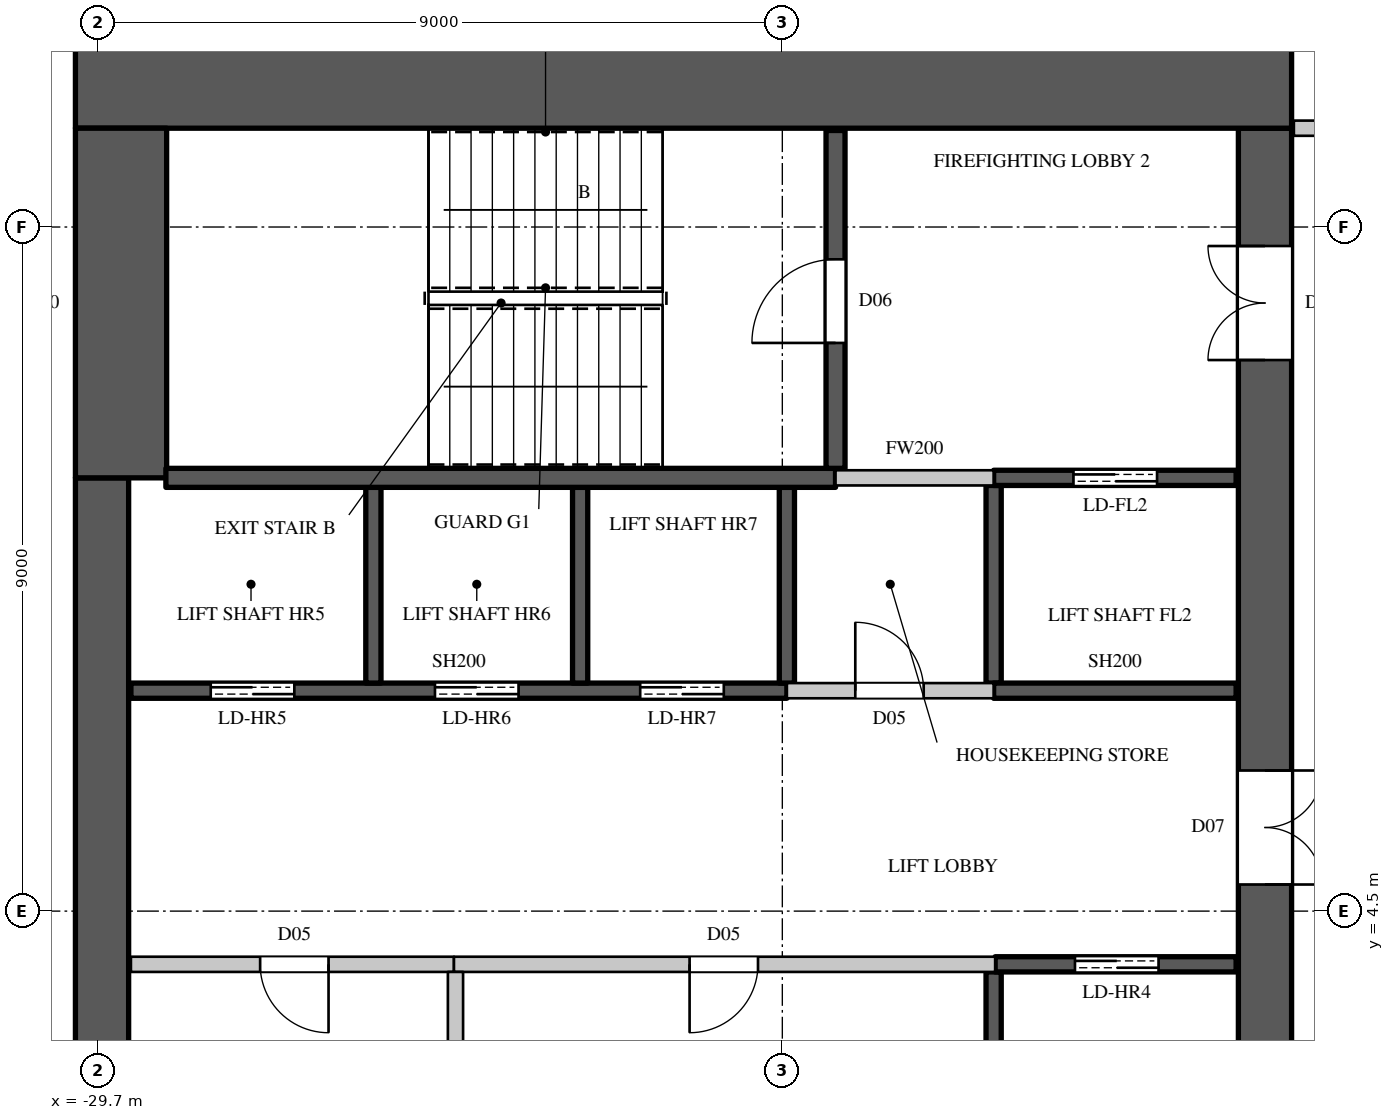
"""IFC4 building model, lengths in metres.
Left out: names, types, materials, properties, quantities, classifications, styles, units other than length and angle.
Written with IfcOpenShell. Run it as: python <this file> out.ifc"""

import sys

from ifc_helpers import new_model, si_unit, direction, frame, frame_2d, origin, place, context, subcontext, project, spatial, rectangle, extrude, element, fill, save


model = new_model("IFC4")
c1 = context("Model", 3, precision=1e-05, world=origin(), true_north=direction((0.0, 1.0)))
c2 = subcontext(c1, "Body", "Model", "MODEL_VIEW")
j1 = project(units=[si_unit("LENGTHUNIT", "METRE"), si_unit("PLANEANGLEUNIT", "RADIAN")], contexts=[c1])
p1 = place(None, origin())
s1 = spatial("IfcSite", under=j1, at=p1, CompositionType="ELEMENT")
p2 = place(p1, origin())
s2 = spatial("IfcBuilding", under=s1, at=p2, CompositionType="ELEMENT")
p3 = place(p2, frame((0.0, 0.0, 268.0)))
s3 = spatial("IfcBuildingStorey", under=s2, at=p3, CompositionType="ELEMENT", Elevation=268.0)
p4 = place(p3, frame((-30.0, 15.4, 0.0), z_axis=(0.0, 0.0, 1.0), x_axis=(1.0, 0.0, 0.0)))
e1 = element("IfcWall", 1, at=p4, inside=s3, PredefinedType="SHEAR", context=c2, shape_type="SweptSolid", body=[
    extrude(rectangle(XDim=16.0, YDim=1.2, at=frame_2d((8.0, 0.0))), origin(), (0.0, 0.0, 1.0), 4.1),
])
p5 = place(p3, frame((-14.35, -14.8, 0.0), z_axis=(0.0, 0.0, 1.0), x_axis=(0.0, 1.0, 0.0)))
e2 = element("IfcWall", 2, at=p5, inside=s3, PredefinedType="SHEAR", context=c2, shape_type="SweptSolid", body=[
    extrude(rectangle(XDim=29.6, YDim=0.7, at=frame_2d((14.8, 0.0))), origin(), (0.0, 0.0, 1.0), 4.1),
])
p6 = place(p5, frame((1.55, 0.0, 0.0)))
e3 = element("IfcOpeningElement", 3, at=p6, cuts=e2, PredefinedType="OPENING", context=c2, shape_type="SweptSolid", body=[
    extrude(rectangle(XDim=1.5, YDim=2.4, at=frame_2d((0.75, 1.2))), frame((0.0, 0.36, 0.0), z_axis=(0.0, -1.0, 0.0), x_axis=(1.0, 0.0, 0.0)), (0.0, 0.0, 1.0), 0.72),
])
p7 = place(p5, frame((26.55, 0.0, 0.0)))
e4 = element("IfcOpeningElement", 4, at=p7, cuts=e2, PredefinedType="OPENING", context=c2, shape_type="SweptSolid", body=[
    extrude(rectangle(XDim=1.5, YDim=2.4, at=frame_2d((0.75, 1.2))), frame((0.0, 0.36, 0.0), z_axis=(0.0, -1.0, 0.0), x_axis=(1.0, 0.0, 0.0)), (0.0, 0.0, 1.0), 0.72),
])
p8 = place(p5, frame((8.45, 0.0, 0.0)))
e5 = element("IfcOpeningElement", 5, at=p8, cuts=e2, PredefinedType="OPENING", context=c2, shape_type="SweptSolid", body=[
    extrude(rectangle(XDim=1.5, YDim=2.4, at=frame_2d((0.75, 1.2))), frame((0.0, 0.36, 0.0), z_axis=(0.0, -1.0, 0.0), x_axis=(1.0, 0.0, 0.0)), (0.0, 0.0, 1.0), 0.72),
])
p9 = place(p5, frame((19.65, 0.0, 0.0)))
e6 = element("IfcOpeningElement", 6, at=p9, cuts=e2, PredefinedType="OPENING", context=c2, shape_type="SweptSolid", body=[
    extrude(rectangle(XDim=1.5, YDim=2.4, at=frame_2d((0.75, 1.2))), frame((0.0, 0.36, 0.0), z_axis=(0.0, -1.0, 0.0), x_axis=(1.0, 0.0, 0.0)), (0.0, 0.0, 1.0), 0.72),
])
p10 = place(p5, frame((14.5, 0.0, 0.0)))
e7 = element("IfcOpeningElement", 7, at=p10, cuts=e2, PredefinedType="OPENING", context=c2, shape_type="SweptSolid", body=[
    extrude(rectangle(XDim=0.6, YDim=2.0, at=frame_2d((0.3, 1.0))), frame((0.0, 0.36, 0.0), z_axis=(0.0, -1.0, 0.0), x_axis=(1.0, 0.0, 0.0)), (0.0, 0.0, 1.0), 0.72),
])
p11 = place(p3, frame((-29.65, -10.2, 0.0), z_axis=(0.0, 0.0, 1.0), x_axis=(0.0, 1.0, 0.0)))
e8 = element("IfcWall", 8, at=p11, inside=s3, PredefinedType="SHEAR", context=c2, shape_type="SweptSolid", body=[
    extrude(rectangle(XDim=20.4, YDim=0.7, at=frame_2d((10.2, 0.0))), origin(), (0.0, 0.0, 1.0), 4.1),
])
p12 = place(p3, frame((-29.4, 10.2, 0.0), z_axis=(0.0, 0.0, 1.0), x_axis=(0.0, 1.0, 0.0)))
e9 = element("IfcWall", 9, at=p12, inside=s3, PredefinedType="SHEAR", context=c2, shape_type="SweptSolid", body=[
    extrude(rectangle(XDim=4.6, YDim=1.2, at=frame_2d((2.3, 0.0))), origin(), (0.0, 0.0, 1.0), 4.1),
])
p13 = place(p3, frame((-29.27, 3.8, 0.0), z_axis=(0.0, 0.0, 1.0), x_axis=(1.0, 0.0, 0.0)))
e10 = element("IfcWall", 10, at=p13, inside=s3, PredefinedType="PARTITIONING", context=c2, shape_type="SweptSolid", body=[
    extrude(rectangle(XDim=4.25, YDim=0.2, at=frame_2d((2.125, 0.0))), origin(), (0.0, 0.0, 1.0), 3.8),
])
p14 = place(p13, frame((1.7, 0.0, 0.0)))
e11 = element("IfcOpeningElement", 11, at=p14, cuts=e10, PredefinedType="OPENING", context=c2, shape_type="SweptSolid", body=[
    extrude(rectangle(XDim=0.9, YDim=2.2, at=frame_2d((0.45, 1.1))), frame((0.0, 0.11, 0.0), z_axis=(0.0, -1.0, 0.0), x_axis=(1.0, 0.0, 0.0)), (0.0, 0.0, 1.0), 0.22),
])
p15 = place(p3, frame((-20.64, 7.4, 0.0), z_axis=(0.0, 0.0, 1.0), x_axis=(1.0, 0.0, 0.0)))
e12 = element("IfcWall", 12, at=p15, inside=s3, PredefinedType="PARTITIONING", context=c2, shape_type="SweptSolid", body=[
    extrude(rectangle(XDim=2.72, YDim=0.2, at=frame_2d((1.36, 0.0))), origin(), (0.0, 0.0, 1.0), 3.8),
])
p16 = place(p15, frame((0.9, 0.0, 0.0)))
e13 = element("IfcOpeningElement", 13, at=p16, cuts=e12, PredefinedType="OPENING", context=c2, shape_type="SweptSolid", body=[
    extrude(rectangle(XDim=0.9, YDim=2.2, at=frame_2d((0.45, 1.1))), frame((0.0, 0.11, 0.0), z_axis=(0.0, -1.0, 0.0), x_axis=(1.0, 0.0, 0.0)), (0.0, 0.0, 1.0), 0.22),
])
p17 = place(p3, frame((-20.0, 10.2, 0.0), z_axis=(0.0, 0.0, 1.0), x_axis=(1.0, 0.0, 0.0)))
e14 = element("IfcWall", 14, at=p17, inside=s3, PredefinedType="PARTITIONING", context=c2, shape_type="SweptSolid", body=[
    extrude(rectangle(XDim=2.08, YDim=0.2, at=frame_2d((1.04, 0.0))), origin(), (0.0, 0.0, 1.0), 3.8),
])
p18 = place(p3, frame((-13.97, 14.8, 0.0), z_axis=(0.0, 0.0, 1.0), x_axis=(1.0, 0.0, 0.0)))
e15 = element("IfcWall", 15, at=p18, inside=s3, PredefinedType="PARTITIONING", context=c2, shape_type="SweptSolid", body=[
    extrude(rectangle(XDim=3.07, YDim=0.2, at=frame_2d((1.535, 0.0))), origin(), (0.0, 0.0, 1.0), 3.8),
])
p19 = place(p3, frame((-25.02, 3.8, 0.0), z_axis=(0.0, 0.0, 1.0), x_axis=(1.0, 0.0, 0.0)))
e16 = element("IfcWall", 16, at=p19, inside=s3, PredefinedType="PARTITIONING", context=c2, shape_type="SweptSolid", body=[
    extrude(rectangle(XDim=7.12, YDim=0.2, at=frame_2d((3.56, 0.0))), origin(), (0.0, 0.0, 1.0), 3.8),
])
p20 = place(p19, frame((3.1, 0.0, 0.0)))
e17 = element("IfcOpeningElement", 17, at=p20, cuts=e16, PredefinedType="OPENING", context=c2, shape_type="SweptSolid", body=[
    extrude(rectangle(XDim=0.9, YDim=2.2, at=frame_2d((0.45, 1.1))), frame((0.0, 0.11, 0.0), z_axis=(0.0, -1.0, 0.0), x_axis=(1.0, 0.0, 0.0)), (0.0, 0.0, 1.0), 0.22),
])
p21 = place(p3, frame((-25.0, 1.1, 0.0), z_axis=(0.0, 0.0, 1.0), x_axis=(0.0, 1.0, 0.0)))
e18 = element("IfcWall", 18, at=p21, inside=s3, PredefinedType="PARTITIONING", context=c2, shape_type="SweptSolid", body=[
    extrude(rectangle(XDim=2.6, YDim=0.2, at=frame_2d((1.3, 0.0))), origin(), (0.0, 0.0, 1.0), 3.8),
])
p22 = place(p3, frame((-29.27, 7.4, 0.0), z_axis=(0.0, 0.0, 1.0), x_axis=(1.0, 0.0, 0.0)))
e19 = element("IfcWall", 19, at=p22, inside=s3, PredefinedType="SHEAR", context=c2, shape_type="SweptSolid", body=[
    extrude(rectangle(XDim=8.63, YDim=0.2, at=frame_2d((4.315, 0.0))), origin(), (0.0, 0.0, 1.0), 3.8),
])
p23 = place(p22, frame((1.05, 0.0, 0.0)))
e20 = element("IfcOpeningElement", 20, at=p23, cuts=e19, PredefinedType="OPENING", context=c2, shape_type="SweptSolid", body=[
    extrude(rectangle(XDim=1.1, YDim=2.2, at=frame_2d((0.55, 1.1))), frame((0.0, 0.11, 0.0), z_axis=(0.0, -1.0, 0.0), x_axis=(1.0, 0.0, 0.0)), (0.0, 0.0, 1.0), 0.22),
])
p24 = place(p22, frame((4.0, 0.0, 0.0)))
e21 = element("IfcOpeningElement", 21, at=p24, cuts=e19, PredefinedType="OPENING", context=c2, shape_type="SweptSolid", body=[
    extrude(rectangle(XDim=1.1, YDim=2.2, at=frame_2d((0.55, 1.1))), frame((0.0, 0.11, 0.0), z_axis=(0.0, -1.0, 0.0), x_axis=(1.0, 0.0, 0.0)), (0.0, 0.0, 1.0), 0.22),
])
p25 = place(p22, frame((6.7, 0.0, 0.0)))
e22 = element("IfcOpeningElement", 22, at=p25, cuts=e19, PredefinedType="OPENING", context=c2, shape_type="SweptSolid", body=[
    extrude(rectangle(XDim=1.1, YDim=2.2, at=frame_2d((0.55, 1.1))), frame((0.0, 0.11, 0.0), z_axis=(0.0, -1.0, 0.0), x_axis=(1.0, 0.0, 0.0)), (0.0, 0.0, 1.0), 0.22),
])
for number, where, z_axis, x_axis in (
    (23, (-26.08, 7.5, 0.0), (0.0, 0.0, 1.0), (0.0, 1.0, 0.0)),
    (24, (-23.36, 7.5, 0.0), (0.0, 0.0, 1.0), (0.0, 1.0, 0.0)),
):
    element("IfcWall", number, at=place(p3, frame(where, z_axis=z_axis, x_axis=x_axis)), inside=s3, PredefinedType="SHEAR", context=c2, shape_type="SweptSolid", body=[
        extrude(rectangle(XDim=2.575, YDim=0.2, at=frame_2d((1.288, 0.0))), origin(), (0.0, 0.0, 1.0), 4.1),
    ])
p26 = place(p3, frame((-20.64, 7.5, 0.0), z_axis=(0.0, 0.0, 1.0), x_axis=(0.0, 1.0, 0.0)))
e25 = element("IfcWall", 25, at=p26, inside=s3, PredefinedType="SHEAR", context=c2, shape_type="SweptSolid", body=[
    extrude(rectangle(XDim=2.575, YDim=0.2, at=frame_2d((1.288, 0.0))), origin(), (0.0, 0.0, 1.0), 3.8),
])
p27 = place(p3, frame((-17.92, 1.1, 0.0), z_axis=(0.0, 0.0, 1.0), x_axis=(0.0, 1.0, 0.0)))
e26 = element("IfcWall", 26, at=p27, inside=s3, PredefinedType="SHEAR", context=c2, shape_type="SweptSolid", body=[
    extrude(rectangle(XDim=2.6, YDim=0.2, at=frame_2d((1.3, 0.0))), origin(), (0.0, 0.0, 1.0), 3.8),
])
p28 = place(p3, frame((-17.9, 3.8, 0.0), z_axis=(0.0, 0.0, 1.0), x_axis=(1.0, 0.0, 0.0)))
e27 = element("IfcWall", 27, at=p28, inside=s3, PredefinedType="SHEAR", context=c2, shape_type="SweptSolid", body=[
    extrude(rectangle(XDim=3.17, YDim=0.2, at=frame_2d((1.585, 0.0))), origin(), (0.0, 0.0, 1.0), 3.8),
])
p29 = place(p28, frame((1.05, 0.0, 0.0)))
e28 = element("IfcOpeningElement", 28, at=p29, cuts=e27, PredefinedType="OPENING", context=c2, shape_type="SweptSolid", body=[
    extrude(rectangle(XDim=1.1, YDim=2.2, at=frame_2d((0.55, 1.1))), frame((0.0, 0.11, 0.0), z_axis=(0.0, -1.0, 0.0), x_axis=(1.0, 0.0, 0.0)), (0.0, 0.0, 1.0), 0.22),
])
p30 = place(p3, frame((-17.92, 7.5, 0.0), z_axis=(0.0, 0.0, 1.0), x_axis=(0.0, 1.0, 0.0)))
e29 = element("IfcWall", 29, at=p30, inside=s3, PredefinedType="SHEAR", context=c2, shape_type="SweptSolid", body=[
    extrude(rectangle(XDim=2.6, YDim=0.2, at=frame_2d((1.3, 0.0))), origin(), (0.0, 0.0, 1.0), 3.8),
])
p31 = place(p3, frame((-17.92, 7.4, 0.0), z_axis=(0.0, 0.0, 1.0), x_axis=(1.0, 0.0, 0.0)))
e30 = element("IfcWall", 30, at=p31, inside=s3, PredefinedType="SHEAR", context=c2, shape_type="SweptSolid", body=[
    extrude(rectangle(XDim=3.19, YDim=0.2, at=frame_2d((1.595, 0.0))), origin(), (0.0, 0.0, 1.0), 3.8),
])
p32 = place(p3, frame((-17.92, 10.2, 0.0), z_axis=(0.0, 0.0, 1.0), x_axis=(1.0, 0.0, 0.0)))
e31 = element("IfcWall", 31, at=p32, inside=s3, PredefinedType="SHEAR", context=c2, shape_type="SweptSolid", body=[
    extrude(rectangle(XDim=3.19, YDim=0.2, at=frame_2d((1.595, 0.0))), origin(), (0.0, 0.0, 1.0), 3.8),
])
p33 = place(p32, frame((1.05, 0.0, 0.0)))
e32 = element("IfcOpeningElement", 32, at=p33, cuts=e31, PredefinedType="OPENING", context=c2, shape_type="SweptSolid", body=[
    extrude(rectangle(XDim=1.1, YDim=2.2, at=frame_2d((0.55, 1.1))), frame((0.0, 0.11, 0.0), z_axis=(0.0, -1.0, 0.0), x_axis=(1.0, 0.0, 0.0)), (0.0, 0.0, 1.0), 0.22),
])
p34 = place(p3, frame((-28.81, 10.2, 0.0), z_axis=(0.0, 0.0, 1.0), x_axis=(1.0, 0.0, 0.0)))
e33 = element("IfcWall", 33, at=p34, inside=s3, PredefinedType="SHEAR", context=c2, shape_type="SweptSolid", body=[
    extrude(rectangle(XDim=8.81, YDim=0.25, at=frame_2d((4.405, 0.0))), origin(), (0.0, 0.0, 1.0), 3.8),
])
p35 = place(p3, frame((-20.0, 10.325, 0.0), z_axis=(0.0, 0.0, 1.0), x_axis=(0.0, 1.0, 0.0)))
e34 = element("IfcWall", 34, at=p35, inside=s3, PredefinedType="SHEAR", context=c2, shape_type="SweptSolid", body=[
    extrude(rectangle(XDim=4.445, YDim=0.25, at=frame_2d((2.223, 0.0))), origin(), (0.0, 0.0, 1.0), 3.8),
])
p36 = place(p35, frame((1.65, 0.0, 0.0)))
e35 = element("IfcOpeningElement", 35, at=p36, cuts=e34, PredefinedType="OPENING", context=c2, shape_type="SweptSolid", body=[
    extrude(rectangle(XDim=1.1, YDim=2.2, at=frame_2d((0.55, 1.1))), frame((0.0, 0.135, 0.0), z_axis=(0.0, -1.0, 0.0), x_axis=(1.0, 0.0, 0.0)), (0.0, 0.0, 1.0), 0.27),
])
p37 = place(p36, origin())
e36 = element("IfcDoor", 36, at=p37, inside=s3, OperationType="SINGLE_SWING_LEFT", PredefinedType="DOOR", context=c2, shape_type="SweptSolid", body=[
    extrude(rectangle(XDim=1.1, YDim=2.2, at=frame_2d((0.55, 1.1))), frame((0.0, 0.025, 0.0), z_axis=(0.0, -1.0, 0.0), x_axis=(1.0, 0.0, 0.0)), (0.0, 0.0, 1.0), 0.05),
])
fill(e35, e36)
p38 = place(p14, origin())
e37 = element("IfcDoor", 37, at=p38, inside=s3, OperationType="SINGLE_SWING_LEFT", PredefinedType="DOOR", context=c2, shape_type="SweptSolid", body=[
    extrude(rectangle(XDim=0.9, YDim=2.2, at=frame_2d((0.45, 1.1))), frame((0.0, 0.025, 0.0), z_axis=(0.0, -1.0, 0.0), x_axis=(1.0, 0.0, 0.0)), (0.0, 0.0, 1.0), 0.05),
])
fill(e11, e37)
p39 = place(p20, origin())
e38 = element("IfcDoor", 38, at=p39, inside=s3, OperationType="SINGLE_SWING_RIGHT", PredefinedType="DOOR", context=c2, shape_type="SweptSolid", body=[
    extrude(rectangle(XDim=0.9, YDim=2.2, at=frame_2d((0.45, 1.1))), frame((0.0, 0.025, 0.0), z_axis=(0.0, -1.0, 0.0), x_axis=(1.0, 0.0, 0.0)), (0.0, 0.0, 1.0), 0.05),
])
fill(e17, e38)
p40 = place(p16, origin())
e39 = element("IfcDoor", 39, at=p40, inside=s3, OperationType="SINGLE_SWING_LEFT", PredefinedType="DOOR", context=c2, shape_type="SweptSolid", body=[
    extrude(rectangle(XDim=0.9, YDim=2.2, at=frame_2d((0.45, 1.1))), frame((0.0, 0.025, 0.0), z_axis=(0.0, -1.0, 0.0), x_axis=(1.0, 0.0, 0.0)), (0.0, 0.0, 1.0), 0.05),
])
fill(e13, e39)
p41 = place(p29, origin())
e40 = element("IfcDoor", 40, at=p41, inside=s3, OperationType="DOUBLE_DOOR_SLIDING", PredefinedType="DOOR", context=c2, shape_type="SweptSolid", body=[
    extrude(rectangle(XDim=1.1, YDim=2.2, at=frame_2d((0.55, 1.1))), frame((0.0, 0.025, 0.0), z_axis=(0.0, -1.0, 0.0), x_axis=(1.0, 0.0, 0.0)), (0.0, 0.0, 1.0), 0.05),
])
fill(e28, e40)
p42 = place(p23, origin())
e41 = element("IfcDoor", 41, at=p42, inside=s3, OperationType="DOUBLE_DOOR_SLIDING", PredefinedType="DOOR", context=c2, shape_type="SweptSolid", body=[
    extrude(rectangle(XDim=1.1, YDim=2.2, at=frame_2d((0.55, 1.1))), frame((0.0, 0.025, 0.0), z_axis=(0.0, -1.0, 0.0), x_axis=(1.0, 0.0, 0.0)), (0.0, 0.0, 1.0), 0.05),
])
fill(e20, e41)
p43 = place(p24, origin())
e42 = element("IfcDoor", 42, at=p43, inside=s3, OperationType="DOUBLE_DOOR_SLIDING", PredefinedType="DOOR", context=c2, shape_type="SweptSolid", body=[
    extrude(rectangle(XDim=1.1, YDim=2.2, at=frame_2d((0.55, 1.1))), frame((0.0, 0.025, 0.0), z_axis=(0.0, -1.0, 0.0), x_axis=(1.0, 0.0, 0.0)), (0.0, 0.0, 1.0), 0.05),
])
fill(e21, e42)
p44 = place(p25, origin())
e43 = element("IfcDoor", 43, at=p44, inside=s3, OperationType="DOUBLE_DOOR_SLIDING", PredefinedType="DOOR", context=c2, shape_type="SweptSolid", body=[
    extrude(rectangle(XDim=1.1, YDim=2.2, at=frame_2d((0.55, 1.1))), frame((0.0, 0.025, 0.0), z_axis=(0.0, -1.0, 0.0), x_axis=(1.0, 0.0, 0.0)), (0.0, 0.0, 1.0), 0.05),
])
fill(e22, e43)
p45 = place(p33, origin())
e44 = element("IfcDoor", 44, at=p45, inside=s3, OperationType="DOUBLE_DOOR_SLIDING", PredefinedType="DOOR", context=c2, shape_type="SweptSolid", body=[
    extrude(rectangle(XDim=1.1, YDim=2.2, at=frame_2d((0.55, 1.1))), frame((0.0, 0.025, 0.0), z_axis=(0.0, -1.0, 0.0), x_axis=(1.0, 0.0, 0.0)), (0.0, 0.0, 1.0), 0.05),
])
fill(e32, e44)
p46 = place(p7, origin())
e45 = element("IfcDoor", 45, at=p46, inside=s3, OperationType="DOUBLE_DOOR_SINGLE_SWING", PredefinedType="DOOR", context=c2, shape_type="SweptSolid", body=[
    extrude(rectangle(XDim=1.5, YDim=2.4, at=frame_2d((0.75, 1.2))), frame((0.0, 0.345, 0.0), z_axis=(0.0, -1.0, 0.0), x_axis=(1.0, 0.0, 0.0)), (0.0, 0.0, 1.0), 0.05),
])
fill(e4, e45)
p47 = place(p9, origin())
e46 = element("IfcDoor", 46, at=p47, inside=s3, OperationType="DOUBLE_DOOR_SINGLE_SWING", PredefinedType="DOOR", context=c2, shape_type="SweptSolid", body=[
    extrude(rectangle(XDim=1.5, YDim=2.4, at=frame_2d((0.75, 1.2))), frame((0.0, -0.295, 0.0), z_axis=(0.0, -1.0, 0.0), x_axis=(1.0, 0.0, 0.0)), (0.0, 0.0, 1.0), 0.05),
])
fill(e6, e46)
save(model, sys.argv[1])
